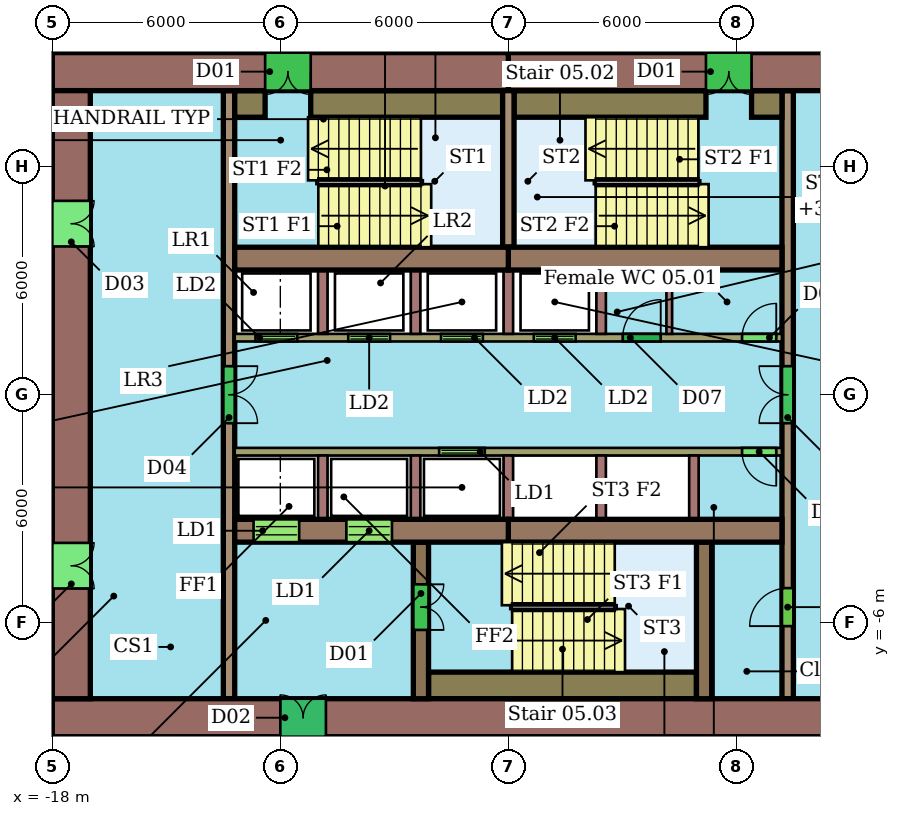
"""IFC4 building model, lengths in metres.
Left out: names, types, materials, properties, quantities, classifications, styles, units other than length and angle.
Written with IfcOpenShell. Run it as: python <this file> out.ifc"""

import sys

from ifc_helpers import new_model, si_unit, direction, frame, frame_2d, origin, place, context, subcontext, project, spatial, rectangle, extrude, element, fill, save


model = new_model("IFC4")
c1 = context("Model", 3, precision=1e-05, world=origin(), true_north=direction((0.0, 1.0)))
c2 = subcontext(c1, "Body", "Model", "MODEL_VIEW")
j1 = project(units=[si_unit("LENGTHUNIT", "METRE"), si_unit("PLANEANGLEUNIT", "RADIAN")], contexts=[c1])
p1 = place(None, origin())
s1 = spatial("IfcSite", under=j1, at=p1, CompositionType="ELEMENT")
p2 = place(p1, origin())
s2 = spatial("IfcBuilding", under=s1, at=p2, CompositionType="ELEMENT")
p3 = place(p2, frame((0.0, 0.0, 36.0)))
s3 = spatial("IfcBuildingStorey", under=s2, at=p3, CompositionType="ELEMENT", Elevation=36.0)
p4 = place(p3, frame((6.0, 8.5, 0.0), z_axis=(0.0, 0.0, 1.0), x_axis=(-1.0, 0.0, 0.0)))
e1 = element("IfcWall", 1, at=p4, inside=s3, PredefinedType="SHEAR", context=c2, shape_type="SweptSolid", body=[
    extrude(rectangle(XDim=12.0, YDim=1.0, at=frame_2d((6.0, 0.0))), origin(), (0.0, 0.0, 1.0), 3.4),
])
p5 = place(p4, frame((5.6, 0.0, 0.0)))
e2 = element("IfcOpeningElement", 2, at=p5, cuts=e1, PredefinedType="OPENING", context=c2, shape_type="SweptSolid", body=[
    extrude(rectangle(XDim=1.2, YDim=2.1, at=frame_2d((0.6, 1.05))), frame((0.0, 0.51, 0.0), z_axis=(0.0, -1.0, 0.0), x_axis=(1.0, 0.0, 0.0)), (0.0, 0.0, 1.0), 1.02),
])
p6 = place(p3, frame((-6.0, 8.5, 0.0), z_axis=(0.0, 0.0, 1.0), x_axis=(-1.0, 0.0, 0.0)))
e3 = element("IfcWall", 3, at=p6, inside=s3, PredefinedType="SHEAR", context=c2, shape_type="SweptSolid", body=[
    extrude(rectangle(XDim=12.0, YDim=1.0, at=frame_2d((6.0, 0.0))), origin(), (0.0, 0.0, 1.0), 3.4),
])
p7 = place(p6, frame((5.2, 0.0, 0.0)))
e4 = element("IfcOpeningElement", 4, at=p7, cuts=e3, PredefinedType="OPENING", context=c2, shape_type="SweptSolid", body=[
    extrude(rectangle(XDim=1.2, YDim=2.1, at=frame_2d((0.6, 1.05))), frame((0.0, 0.51, 0.0), z_axis=(0.0, -1.0, 0.0), x_axis=(1.0, 0.0, 0.0)), (0.0, 0.0, 1.0), 1.02),
])
p8 = place(p3, frame((-18.0, -8.5, 0.0), z_axis=(0.0, 0.0, 1.0), x_axis=(1.0, 0.0, 0.0)))
e5 = element("IfcWall", 5, at=p8, inside=s3, PredefinedType="SHEAR", context=c2, shape_type="SweptSolid", body=[
    extrude(rectangle(XDim=24.0, YDim=1.0, at=frame_2d((12.0, 0.0))), origin(), (0.0, 0.0, 1.0), 3.4),
])
p9 = place(p8, frame((6.0, 0.0, 0.0)))
e6 = element("IfcOpeningElement", 6, at=p9, cuts=e5, PredefinedType="OPENING", context=c2, shape_type="SweptSolid", body=[
    extrude(rectangle(XDim=1.2, YDim=2.1, at=frame_2d((0.6, 1.05))), frame((0.0, 0.51, 0.0), z_axis=(0.0, -1.0, 0.0), x_axis=(1.0, 0.0, 0.0)), (0.0, 0.0, 1.0), 1.02),
])
p10 = place(p3, frame((-17.5, 8.0, 0.0), z_axis=(0.0, 0.0, 1.0), x_axis=(0.0, -1.0, 0.0)))
e7 = element("IfcWall", 7, at=p10, inside=s3, PredefinedType="SHEAR", context=c2, shape_type="SweptSolid", body=[
    extrude(rectangle(XDim=16.0, YDim=1.0, at=frame_2d((8.0, 0.0))), origin(), (0.0, 0.0, 1.0), 3.4),
])
p11 = place(p10, frame((11.9, 0.0, 0.0)))
e8 = element("IfcOpeningElement", 8, at=p11, cuts=e7, PredefinedType="OPENING", context=c2, shape_type="SweptSolid", body=[
    extrude(rectangle(XDim=1.2, YDim=2.1, at=frame_2d((0.6, 1.05))), frame((0.0, 0.51, 0.0), z_axis=(0.0, -1.0, 0.0), x_axis=(1.0, 0.0, 0.0)), (0.0, 0.0, 1.0), 1.02),
])
p12 = place(p10, frame((2.9, 0.0, 0.0)))
e9 = element("IfcOpeningElement", 9, at=p12, cuts=e7, PredefinedType="OPENING", context=c2, shape_type="SweptSolid", body=[
    extrude(rectangle(XDim=1.2, YDim=2.1, at=frame_2d((0.6, 1.05))), frame((0.0, 0.51, 0.0), z_axis=(0.0, -1.0, 0.0), x_axis=(1.0, 0.0, 0.0)), (0.0, 0.0, 1.0), 1.02),
])
for number, where, z_axis, x_axis in (
    (10, (-13.2, 3.58, 0.0), (0.0, 0.0, 1.0), (1.0, 0.0, 0.0)),
    (11, (-6.0, 3.58, 0.0), (0.0, 0.0, 1.0), (1.0, 0.0, 0.0)),
):
    element("IfcWall", number, at=place(p3, frame(where, z_axis=z_axis, x_axis=x_axis)), inside=s3, PredefinedType="SHEAR", context=c2, shape_type="SweptSolid", body=[
        extrude(rectangle(XDim=7.2, YDim=0.6, at=frame_2d((3.6, 0.0))), origin(), (0.0, 0.0, 1.0), 3.4),
    ])
p13 = place(p3, frame((-13.2, -3.58, 0.0), z_axis=(0.0, 0.0, 1.0), x_axis=(1.0, 0.0, 0.0)))
e12 = element("IfcWall", 12, at=p13, inside=s3, PredefinedType="SHEAR", context=c2, shape_type="SweptSolid", body=[
    extrude(rectangle(XDim=7.2, YDim=0.6, at=frame_2d((3.6, 0.0))), origin(), (0.0, 0.0, 1.0), 3.4),
])
p14 = place(p13, frame((0.496, 0.0, 0.0)))
e13 = element("IfcOpeningElement", 13, at=p14, cuts=e12, PredefinedType="OPENING", context=c2, shape_type="SweptSolid", body=[
    extrude(rectangle(XDim=1.2, YDim=2.1, at=frame_2d((0.6, 1.05))), frame((0.0, 0.31, 0.0), z_axis=(0.0, -1.0, 0.0), x_axis=(1.0, 0.0, 0.0)), (0.0, 0.0, 1.0), 0.62),
])
p15 = place(p13, frame((2.938, 0.0, 0.0)))
e14 = element("IfcOpeningElement", 14, at=p15, cuts=e12, PredefinedType="OPENING", context=c2, shape_type="SweptSolid", body=[
    extrude(rectangle(XDim=1.2, YDim=2.1, at=frame_2d((0.6, 1.05))), frame((0.0, 0.31, 0.0), z_axis=(0.0, -1.0, 0.0), x_axis=(1.0, 0.0, 0.0)), (0.0, 0.0, 1.0), 0.62),
])
p16 = place(p3, frame((-6.0, -3.58, 0.0), z_axis=(0.0, 0.0, 1.0), x_axis=(1.0, 0.0, 0.0)))
e15 = element("IfcWall", 15, at=p16, inside=s3, PredefinedType="SHEAR", context=c2, shape_type="SweptSolid", body=[
    extrude(rectangle(XDim=7.2, YDim=0.6, at=frame_2d((3.6, 0.0))), origin(), (0.0, 0.0, 1.0), 3.4),
])
p17 = place(p3, frame((-13.35, 8.0, 0.0), z_axis=(0.0, 0.0, 1.0), x_axis=(0.0, -1.0, 0.0)))
e16 = element("IfcWall", 16, at=p17, inside=s3, PredefinedType="SHEAR", context=c2, shape_type="SweptSolid", body=[
    extrude(rectangle(XDim=16.0, YDim=0.3, at=frame_2d((8.0, 0.0))), origin(), (0.0, 0.0, 1.0), 3.4),
])
p18 = place(p17, frame((7.25, 0.0, 0.0)))
e17 = element("IfcOpeningElement", 17, at=p18, cuts=e16, PredefinedType="OPENING", context=c2, shape_type="SweptSolid", body=[
    extrude(rectangle(XDim=1.5, YDim=2.1, at=frame_2d((0.75, 1.05))), frame((0.0, 0.16, 0.0), z_axis=(0.0, -1.0, 0.0), x_axis=(1.0, 0.0, 0.0)), (0.0, 0.0, 1.0), 0.32),
])
p19 = place(p3, frame((1.35, -8.0, 0.0), z_axis=(0.0, 0.0, 1.0), x_axis=(0.0, 1.0, 0.0)))
e18 = element("IfcWall", 18, at=p19, inside=s3, PredefinedType="SHEAR", context=c2, shape_type="SweptSolid", body=[
    extrude(rectangle(XDim=16.0, YDim=0.3, at=frame_2d((8.0, 0.0))), origin(), (0.0, 0.0, 1.0), 3.4),
])
p20 = place(p19, frame((1.91, 0.0, 0.0)))
e19 = element("IfcOpeningElement", 19, at=p20, cuts=e18, PredefinedType="OPENING", context=c2, shape_type="SweptSolid", body=[
    extrude(rectangle(XDim=1.0, YDim=2.1, at=frame_2d((0.5, 1.05))), frame((0.0, 0.16, 0.0), z_axis=(0.0, -1.0, 0.0), x_axis=(1.0, 0.0, 0.0)), (0.0, 0.0, 1.0), 0.32),
])
p21 = place(p19, frame((7.25, 0.0, 0.0)))
e20 = element("IfcOpeningElement", 20, at=p21, cuts=e18, PredefinedType="OPENING", context=c2, shape_type="SweptSolid", body=[
    extrude(rectangle(XDim=1.5, YDim=2.1, at=frame_2d((0.75, 1.05))), frame((0.0, 0.16, 0.0), z_axis=(0.0, -1.0, 0.0), x_axis=(1.0, 0.0, 0.0)), (0.0, 0.0, 1.0), 0.32),
])
p22 = place(p3, frame((-13.2, 1.5, 0.0), z_axis=(0.0, 0.0, 1.0), x_axis=(1.0, 0.0, 0.0)))
e21 = element("IfcWall", 21, at=p22, inside=s3, PredefinedType="SHEAR", context=c2, shape_type="SweptSolid", body=[
    extrude(rectangle(XDim=14.4, YDim=0.2, at=frame_2d((7.2, 0.0))), origin(), (0.0, 0.0, 1.0), 3.4),
])
p23 = place(p22, frame((0.546, 0.0, 0.0)))
e22 = element("IfcOpeningElement", 22, at=p23, cuts=e21, PredefinedType="OPENING", context=c2, shape_type="SweptSolid", body=[
    extrude(rectangle(XDim=1.1, YDim=2.1, at=frame_2d((0.55, 1.05))), frame((0.0, 0.11, 0.0), z_axis=(0.0, -1.0, 0.0), x_axis=(1.0, 0.0, 0.0)), (0.0, 0.0, 1.0), 0.22),
])
p24 = place(p22, frame((2.988, 0.0, 0.0)))
e23 = element("IfcOpeningElement", 23, at=p24, cuts=e21, PredefinedType="OPENING", context=c2, shape_type="SweptSolid", body=[
    extrude(rectangle(XDim=1.1, YDim=2.1, at=frame_2d((0.55, 1.05))), frame((0.0, 0.11, 0.0), z_axis=(0.0, -1.0, 0.0), x_axis=(1.0, 0.0, 0.0)), (0.0, 0.0, 1.0), 0.22),
])
p25 = place(p22, frame((5.429, 0.0, 0.0)))
e24 = element("IfcOpeningElement", 24, at=p25, cuts=e21, PredefinedType="OPENING", context=c2, shape_type="SweptSolid", body=[
    extrude(rectangle(XDim=1.1, YDim=2.1, at=frame_2d((0.55, 1.05))), frame((0.0, 0.11, 0.0), z_axis=(0.0, -1.0, 0.0), x_axis=(1.0, 0.0, 0.0)), (0.0, 0.0, 1.0), 0.22),
])
p26 = place(p22, frame((7.871, 0.0, 0.0)))
e25 = element("IfcOpeningElement", 25, at=p26, cuts=e21, PredefinedType="OPENING", context=c2, shape_type="SweptSolid", body=[
    extrude(rectangle(XDim=1.1, YDim=2.1, at=frame_2d((0.55, 1.05))), frame((0.0, 0.11, 0.0), z_axis=(0.0, -1.0, 0.0), x_axis=(1.0, 0.0, 0.0)), (0.0, 0.0, 1.0), 0.22),
])
p27 = place(p22, frame((10.21, 0.0, 0.0)))
e26 = element("IfcOpeningElement", 26, at=p27, cuts=e21, PredefinedType="OPENING", context=c2, shape_type="SweptSolid", body=[
    extrude(rectangle(XDim=1.0, YDim=2.1, at=frame_2d((0.5, 1.05))), frame((0.0, 0.11, 0.0), z_axis=(0.0, -1.0, 0.0), x_axis=(1.0, 0.0, 0.0)), (0.0, 0.0, 1.0), 0.22),
])
p28 = place(p22, frame((13.35, 0.0, 0.0)))
e27 = element("IfcOpeningElement", 27, at=p28, cuts=e21, PredefinedType="OPENING", context=c2, shape_type="SweptSolid", body=[
    extrude(rectangle(XDim=0.9, YDim=2.1, at=frame_2d((0.45, 1.05))), frame((0.0, 0.11, 0.0), z_axis=(0.0, -1.0, 0.0), x_axis=(1.0, 0.0, 0.0)), (0.0, 0.0, 1.0), 0.22),
])
p29 = place(p3, frame((1.2, -1.5, 0.0), z_axis=(0.0, 0.0, 1.0), x_axis=(-1.0, 0.0, 0.0)))
e28 = element("IfcWall", 28, at=p29, inside=s3, PredefinedType="SHEAR", context=c2, shape_type="SweptSolid", body=[
    extrude(rectangle(XDim=14.4, YDim=0.2, at=frame_2d((7.2, 0.0))), origin(), (0.0, 0.0, 1.0), 3.4),
])
p30 = place(p29, frame((7.821, 0.0, 0.0)))
e29 = element("IfcOpeningElement", 29, at=p30, cuts=e28, PredefinedType="OPENING", context=c2, shape_type="SweptSolid", body=[
    extrude(rectangle(XDim=1.2, YDim=2.1, at=frame_2d((0.6, 1.05))), frame((0.0, 0.11, 0.0), z_axis=(0.0, -1.0, 0.0), x_axis=(1.0, 0.0, 0.0)), (0.0, 0.0, 1.0), 0.22),
])
p31 = place(p29, frame((0.15, 0.0, 0.0)))
e30 = element("IfcOpeningElement", 30, at=p31, cuts=e28, PredefinedType="OPENING", context=c2, shape_type="SweptSolid", body=[
    extrude(rectangle(XDim=0.9, YDim=2.1, at=frame_2d((0.45, 1.05))), frame((0.0, 0.11, 0.0), z_axis=(0.0, -1.0, 0.0), x_axis=(1.0, 0.0, 0.0)), (0.0, 0.0, 1.0), 0.22),
])
p32 = place(p3, frame((-8.3, -3.88, 0.0), z_axis=(0.0, 0.0, 1.0), x_axis=(0.0, -1.0, 0.0)))
e31 = element("IfcWall", 31, at=p32, inside=s3, PredefinedType="SHEAR", context=c2, shape_type="SweptSolid", body=[
    extrude(rectangle(XDim=4.12, YDim=0.4, at=frame_2d((2.06, 0.0))), origin(), (0.0, 0.0, 1.0), 3.4),
])
p33 = place(p32, frame((1.11, 0.0, 0.0)))
e32 = element("IfcOpeningElement", 32, at=p33, cuts=e31, PredefinedType="OPENING", context=c2, shape_type="SweptSolid", body=[
    extrude(rectangle(XDim=1.2, YDim=2.1, at=frame_2d((0.6, 1.05))), frame((0.0, 0.21, 0.0), z_axis=(0.0, -1.0, 0.0), x_axis=(1.0, 0.0, 0.0)), (0.0, 0.0, 1.0), 0.42),
])
p34 = place(p3, frame((-0.85, -3.88, 0.0), z_axis=(0.0, 0.0, 1.0), x_axis=(0.0, -1.0, 0.0)))
e33 = element("IfcWall", 33, at=p34, inside=s3, PredefinedType="SHEAR", context=c2, shape_type="SweptSolid", body=[
    extrude(rectangle(XDim=4.12, YDim=0.4, at=frame_2d((2.06, 0.0))), origin(), (0.0, 0.0, 1.0), 3.4),
])
p35 = place(p3, frame((-6.0, 3.88, 0.0), z_axis=(0.0, 0.0, 1.0), x_axis=(0.0, 1.0, 0.0)))
e34 = element("IfcWall", 34, at=p35, inside=s3, PredefinedType="SHEAR", context=c2, shape_type="SweptSolid", body=[
    extrude(rectangle(XDim=4.12, YDim=0.3, at=frame_2d((2.06, 0.0))), origin(), (0.0, 0.0, 1.0), 3.4),
])
p36 = place(p3, frame((-13.2, 7.65, 0.0), z_axis=(0.0, 0.0, 1.0), x_axis=(1.0, 0.0, 0.0)))
e35 = element("IfcWall", 35, at=p36, inside=s3, PredefinedType="SHEAR", context=c2, shape_type="SweptSolid", body=[
    extrude(rectangle(XDim=0.8, YDim=0.7, at=frame_2d((0.4, 0.0))), origin(), (0.0, 0.0, 1.0), 3.4),
])
for number, where, z_axis, x_axis in (
    (36, (-11.2, 7.65, 0.0), (0.0, 0.0, 1.0), (1.0, 0.0, 0.0)),
    (37, (-5.85, 7.65, 0.0), (0.0, 0.0, 1.0), (1.0, 0.0, 0.0)),
):
    element("IfcWall", number, at=place(p3, frame(where, z_axis=z_axis, x_axis=x_axis)), inside=s3, PredefinedType="SHEAR", context=c2, shape_type="SweptSolid", body=[
        extrude(rectangle(XDim=5.05, YDim=0.7, at=frame_2d((2.525, 0.0))), origin(), (0.0, 0.0, 1.0), 3.4),
    ])
p37 = place(p3, frame((0.4, 7.65, 0.0), z_axis=(0.0, 0.0, 1.0), x_axis=(1.0, 0.0, 0.0)))
e38 = element("IfcWall", 38, at=p37, inside=s3, PredefinedType="SHEAR", context=c2, shape_type="SweptSolid", body=[
    extrude(rectangle(XDim=0.8, YDim=0.7, at=frame_2d((0.4, 0.0))), origin(), (0.0, 0.0, 1.0), 3.4),
])
p38 = place(p3, frame((-8.1, -7.65, 0.0), z_axis=(0.0, 0.0, 1.0), x_axis=(1.0, 0.0, 0.0)))
e39 = element("IfcWall", 39, at=p38, inside=s3, PredefinedType="SHEAR", context=c2, shape_type="SweptSolid", body=[
    extrude(rectangle(XDim=7.05, YDim=0.7, at=frame_2d((3.525, 0.0))), origin(), (0.0, 0.0, 1.0), 3.4),
])
for number, where, z_axis, x_axis in (
    (40, (-10.883, 1.6, 0.0), (0.0, 0.0, 1.0), (0.0, 1.0, 0.0)),
    (41, (-8.442, 1.6, 0.0), (0.0, 0.0, 1.0), (0.0, 1.0, 0.0)),
    (42, (-6.0, 1.6, 0.0), (0.0, 0.0, 1.0), (0.0, 1.0, 0.0)),
    (43, (-3.558, 1.6, 0.0), (0.0, 0.0, 1.0), (0.0, 1.0, 0.0)),
):
    element("IfcWall", number, at=place(p3, frame(where, z_axis=z_axis, x_axis=x_axis)), inside=s3, PredefinedType="SHEAR", context=c2, shape_type="SweptSolid", body=[
        extrude(rectangle(XDim=1.68, YDim=0.25, at=frame_2d((0.84, 0.0))), origin(), (0.0, 0.0, 1.0), 3.4),
    ])
p39 = place(p3, frame((-1.765, 1.6, 0.0), z_axis=(0.0, 0.0, 1.0), x_axis=(0.0, 1.0, 0.0)))
e44 = element("IfcWall", 44, at=p39, inside=s3, PredefinedType="PARTITIONING", context=c2, shape_type="SweptSolid", body=[
    extrude(rectangle(XDim=1.68, YDim=0.15, at=frame_2d((0.84, 0.0))), origin(), (0.0, 0.0, 1.0), 3.4),
])
for number, where, z_axis, x_axis in (
    (45, (-10.883, -1.6, 0.0), (0.0, 0.0, 1.0), (0.0, -1.0, 0.0)),
    (46, (-8.442, -1.6, 0.0), (0.0, 0.0, 1.0), (0.0, -1.0, 0.0)),
    (47, (-6.0, -1.6, 0.0), (0.0, 0.0, 1.0), (0.0, -1.0, 0.0)),
    (48, (-3.558, -1.6, 0.0), (0.0, 0.0, 1.0), (0.0, -1.0, 0.0)),
    (49, (-1.117, -1.6, 0.0), (0.0, 0.0, 1.0), (0.0, -1.0, 0.0)),
):
    element("IfcWall", number, at=place(p3, frame(where, z_axis=z_axis, x_axis=x_axis)), inside=s3, PredefinedType="SHEAR", context=c2, shape_type="SweptSolid", body=[
        extrude(rectangle(XDim=1.68, YDim=0.25, at=frame_2d((0.84, 0.0))), origin(), (0.0, 0.0, 1.0), 3.4),
    ])
p40 = place(p5, origin())
e50 = element("IfcDoor", 50, at=p40, inside=s3, OperationType="DOUBLE_DOOR_SINGLE_SWING", PredefinedType="NOTDEFINED", context=c2, shape_type="SweptSolid", body=[
    extrude(rectangle(XDim=1.2, YDim=2.1, at=frame_2d((0.6, 1.05))), frame((0.0, 0.025, 0.0), z_axis=(0.0, -1.0, 0.0), x_axis=(1.0, 0.0, 0.0)), (0.0, 0.0, 1.0), 0.05),
])
fill(e2, e50)
p41 = place(p7, origin())
e51 = element("IfcDoor", 51, at=p41, inside=s3, OperationType="DOUBLE_DOOR_SINGLE_SWING", PredefinedType="NOTDEFINED", context=c2, shape_type="SweptSolid", body=[
    extrude(rectangle(XDim=1.2, YDim=2.1, at=frame_2d((0.6, 1.05))), frame((0.0, 0.025, 0.0), z_axis=(0.0, -1.0, 0.0), x_axis=(1.0, 0.0, 0.0)), (0.0, 0.0, 1.0), 0.05),
])
fill(e4, e51)
p42 = place(p9, origin())
e52 = element("IfcDoor", 52, at=p42, inside=s3, OperationType="DOUBLE_DOOR_SINGLE_SWING", PredefinedType="NOTDEFINED", context=c2, shape_type="SweptSolid", body=[
    extrude(rectangle(XDim=1.2, YDim=2.1, at=frame_2d((0.6, 1.05))), frame((0.0, 0.025, 0.0), z_axis=(0.0, -1.0, 0.0), x_axis=(1.0, 0.0, 0.0)), (0.0, 0.0, 1.0), 0.05),
])
fill(e6, e52)
p43 = place(p11, origin())
e53 = element("IfcDoor", 53, at=p43, inside=s3, OperationType="DOUBLE_DOOR_SINGLE_SWING", PredefinedType="NOTDEFINED", context=c2, shape_type="SweptSolid", body=[
    extrude(rectangle(XDim=1.2, YDim=2.1, at=frame_2d((0.6, 1.05))), frame((0.0, 0.025, 0.0), z_axis=(0.0, -1.0, 0.0), x_axis=(1.0, 0.0, 0.0)), (0.0, 0.0, 1.0), 0.05),
])
fill(e8, e53)
p44 = place(p12, origin())
e54 = element("IfcDoor", 54, at=p44, inside=s3, OperationType="DOUBLE_DOOR_SINGLE_SWING", PredefinedType="NOTDEFINED", context=c2, shape_type="SweptSolid", body=[
    extrude(rectangle(XDim=1.2, YDim=2.1, at=frame_2d((0.6, 1.05))), frame((0.0, 0.025, 0.0), z_axis=(0.0, -1.0, 0.0), x_axis=(1.0, 0.0, 0.0)), (0.0, 0.0, 1.0), 0.05),
])
fill(e9, e54)
p45 = place(p14, origin())
e55 = element("IfcDoor", 55, at=p45, inside=s3, OperationType="DOUBLE_DOOR_SLIDING", PredefinedType="NOTDEFINED", context=c2, shape_type="SweptSolid", body=[
    extrude(rectangle(XDim=1.2, YDim=2.1, at=frame_2d((0.6, 1.05))), frame((0.0, 0.025, 0.0), z_axis=(0.0, -1.0, 0.0), x_axis=(1.0, 0.0, 0.0)), (0.0, 0.0, 1.0), 0.05),
])
fill(e13, e55)
p46 = place(p15, origin())
e56 = element("IfcDoor", 56, at=p46, inside=s3, OperationType="DOUBLE_DOOR_SLIDING", PredefinedType="NOTDEFINED", context=c2, shape_type="SweptSolid", body=[
    extrude(rectangle(XDim=1.2, YDim=2.1, at=frame_2d((0.6, 1.05))), frame((0.0, 0.025, 0.0), z_axis=(0.0, -1.0, 0.0), x_axis=(1.0, 0.0, 0.0)), (0.0, 0.0, 1.0), 0.05),
])
fill(e14, e56)
p47 = place(p18, origin())
e57 = element("IfcDoor", 57, at=p47, inside=s3, OperationType="DOUBLE_DOOR_SINGLE_SWING", PredefinedType="NOTDEFINED", context=c2, shape_type="SweptSolid", body=[
    extrude(rectangle(XDim=1.5, YDim=2.1, at=frame_2d((0.75, 1.05))), frame((0.0, 0.025, 0.0), z_axis=(0.0, -1.0, 0.0), x_axis=(1.0, 0.0, 0.0)), (0.0, 0.0, 1.0), 0.05),
])
fill(e17, e57)
p48 = place(p20, origin())
e58 = element("IfcDoor", 58, at=p48, inside=s3, OperationType="SINGLE_SWING_LEFT", PredefinedType="NOTDEFINED", context=c2, shape_type="SweptSolid", body=[
    extrude(rectangle(XDim=1.0, YDim=2.1, at=frame_2d((0.5, 1.05))), frame((0.0, 0.025, 0.0), z_axis=(0.0, -1.0, 0.0), x_axis=(1.0, 0.0, 0.0)), (0.0, 0.0, 1.0), 0.05),
])
fill(e19, e58)
p49 = place(p21, origin())
e59 = element("IfcDoor", 59, at=p49, inside=s3, OperationType="DOUBLE_DOOR_SINGLE_SWING", PredefinedType="NOTDEFINED", context=c2, shape_type="SweptSolid", body=[
    extrude(rectangle(XDim=1.5, YDim=2.1, at=frame_2d((0.75, 1.05))), frame((0.0, 0.025, 0.0), z_axis=(0.0, -1.0, 0.0), x_axis=(1.0, 0.0, 0.0)), (0.0, 0.0, 1.0), 0.05),
])
fill(e20, e59)
p50 = place(p23, origin())
e60 = element("IfcDoor", 60, at=p50, inside=s3, OperationType="DOUBLE_DOOR_SLIDING", PredefinedType="NOTDEFINED", context=c2, shape_type="SweptSolid", body=[
    extrude(rectangle(XDim=1.1, YDim=2.1, at=frame_2d((0.55, 1.05))), frame((0.0, 0.025, 0.0), z_axis=(0.0, -1.0, 0.0), x_axis=(1.0, 0.0, 0.0)), (0.0, 0.0, 1.0), 0.05),
])
fill(e22, e60)
p51 = place(p24, origin())
e61 = element("IfcDoor", 61, at=p51, inside=s3, OperationType="DOUBLE_DOOR_SLIDING", PredefinedType="NOTDEFINED", context=c2, shape_type="SweptSolid", body=[
    extrude(rectangle(XDim=1.1, YDim=2.1, at=frame_2d((0.55, 1.05))), frame((0.0, 0.025, 0.0), z_axis=(0.0, -1.0, 0.0), x_axis=(1.0, 0.0, 0.0)), (0.0, 0.0, 1.0), 0.05),
])
fill(e23, e61)
p52 = place(p25, origin())
e62 = element("IfcDoor", 62, at=p52, inside=s3, OperationType="DOUBLE_DOOR_SLIDING", PredefinedType="NOTDEFINED", context=c2, shape_type="SweptSolid", body=[
    extrude(rectangle(XDim=1.1, YDim=2.1, at=frame_2d((0.55, 1.05))), frame((0.0, 0.025, 0.0), z_axis=(0.0, -1.0, 0.0), x_axis=(1.0, 0.0, 0.0)), (0.0, 0.0, 1.0), 0.05),
])
fill(e24, e62)
p53 = place(p26, origin())
e63 = element("IfcDoor", 63, at=p53, inside=s3, OperationType="DOUBLE_DOOR_SLIDING", PredefinedType="NOTDEFINED", context=c2, shape_type="SweptSolid", body=[
    extrude(rectangle(XDim=1.1, YDim=2.1, at=frame_2d((0.55, 1.05))), frame((0.0, 0.025, 0.0), z_axis=(0.0, -1.0, 0.0), x_axis=(1.0, 0.0, 0.0)), (0.0, 0.0, 1.0), 0.05),
])
fill(e25, e63)
p54 = place(p27, origin())
e64 = element("IfcDoor", 64, at=p54, inside=s3, OperationType="SINGLE_SWING_RIGHT", PredefinedType="NOTDEFINED", context=c2, shape_type="SweptSolid", body=[
    extrude(rectangle(XDim=1.0, YDim=2.1, at=frame_2d((0.5, 1.05))), frame((0.0, 0.025, 0.0), z_axis=(0.0, -1.0, 0.0), x_axis=(1.0, 0.0, 0.0)), (0.0, 0.0, 1.0), 0.05),
])
fill(e26, e64)
p55 = place(p28, origin())
e65 = element("IfcDoor", 65, at=p55, inside=s3, OperationType="SINGLE_SWING_RIGHT", PredefinedType="NOTDEFINED", context=c2, shape_type="SweptSolid", body=[
    extrude(rectangle(XDim=0.9, YDim=2.1, at=frame_2d((0.45, 1.05))), frame((0.0, 0.025, 0.0), z_axis=(0.0, -1.0, 0.0), x_axis=(1.0, 0.0, 0.0)), (0.0, 0.0, 1.0), 0.05),
])
fill(e27, e65)
p56 = place(p30, origin())
e66 = element("IfcDoor", 66, at=p56, inside=s3, OperationType="DOUBLE_DOOR_SLIDING", PredefinedType="NOTDEFINED", context=c2, shape_type="SweptSolid", body=[
    extrude(rectangle(XDim=1.2, YDim=2.1, at=frame_2d((0.6, 1.05))), frame((0.0, 0.025, 0.0), z_axis=(0.0, -1.0, 0.0), x_axis=(1.0, 0.0, 0.0)), (0.0, 0.0, 1.0), 0.05),
])
fill(e29, e66)
p57 = place(p31, origin())
e67 = element("IfcDoor", 67, at=p57, inside=s3, OperationType="SINGLE_SWING_LEFT", PredefinedType="NOTDEFINED", context=c2, shape_type="SweptSolid", body=[
    extrude(rectangle(XDim=0.9, YDim=2.1, at=frame_2d((0.45, 1.05))), frame((0.0, 0.025, 0.0), z_axis=(0.0, -1.0, 0.0), x_axis=(1.0, 0.0, 0.0)), (0.0, 0.0, 1.0), 0.05),
])
fill(e30, e67)
p58 = place(p33, origin())
e68 = element("IfcDoor", 68, at=p58, inside=s3, OperationType="DOUBLE_DOOR_SINGLE_SWING", PredefinedType="NOTDEFINED", context=c2, shape_type="SweptSolid", body=[
    extrude(rectangle(XDim=1.2, YDim=2.1, at=frame_2d((0.6, 1.05))), frame((0.0, 0.025, 0.0), z_axis=(0.0, -1.0, 0.0), x_axis=(1.0, 0.0, 0.0)), (0.0, 0.0, 1.0), 0.05),
])
fill(e32, e68)
save(model, sys.argv[1])
